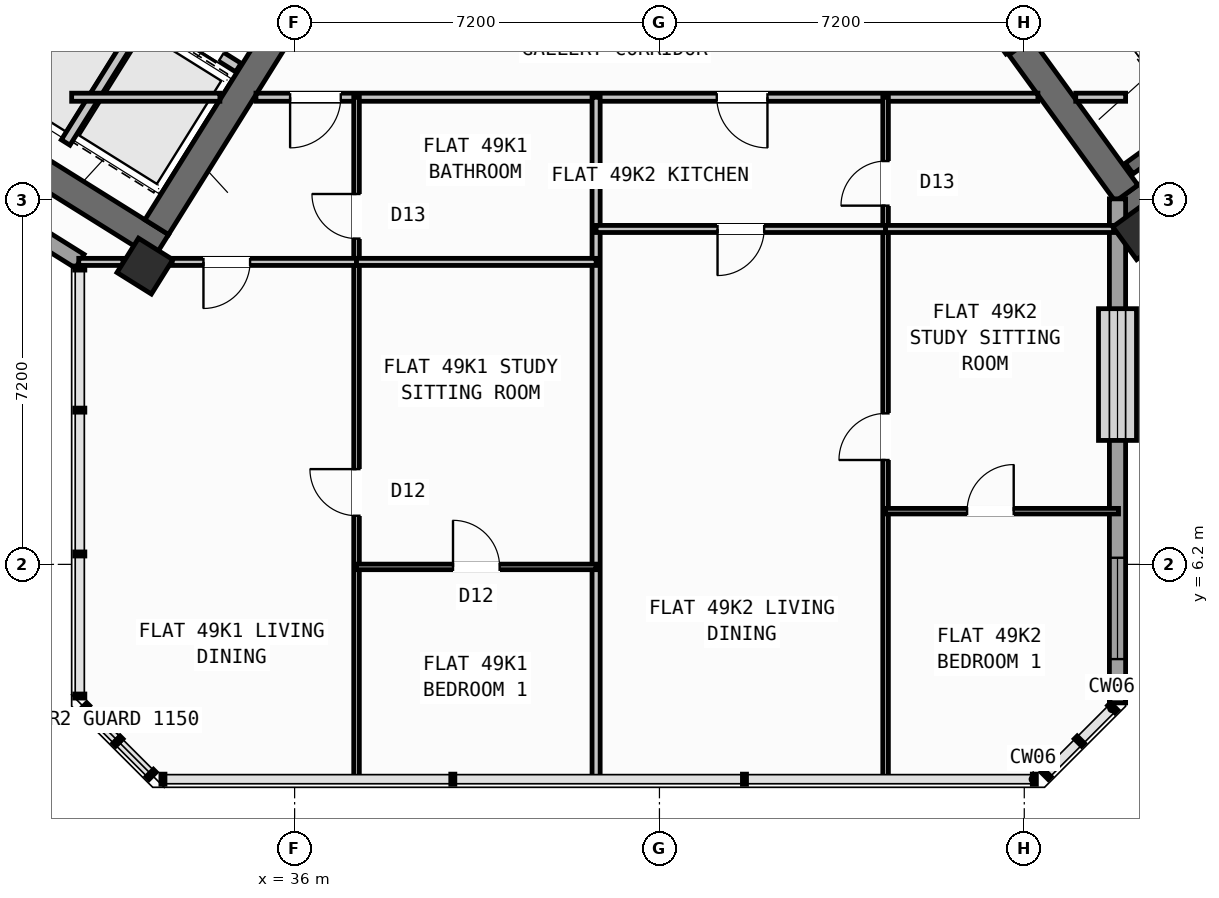
"""IFC4 building model, lengths in metres.
Left out: names, types, materials, properties, quantities, classifications, styles, units other than length and angle.
Written with IfcOpenShell. Run it as: python <this file> out.ifc"""

import sys

from ifc_helpers import new_model, si_unit, direction, frame, frame_2d, origin, origin_2d, place, context, subcontext, project, spatial, rectangle, hollow_rectangle, extrude, source, transform, mapped, element, fill, save


model = new_model("IFC4")
c1 = context("Model", 3, precision=1e-05, world=origin(), true_north=direction((0.0, 1.0)))
c2 = subcontext(c1, "Body", "Model", "MODEL_VIEW")
j1 = project(units=[si_unit("LENGTHUNIT", "METRE"), si_unit("PLANEANGLEUNIT", "RADIAN")], contexts=[c1])
p1 = place(None, origin())
s1 = spatial("IfcSite", under=j1, at=p1, CompositionType="ELEMENT")
p2 = place(p1, origin())
s2 = spatial("IfcBuilding", under=s1, at=p2, CompositionType="ELEMENT")
p3 = place(p2, frame((0.0, 0.0, 195.0)))
s3 = spatial("IfcBuildingStorey", under=s2, at=p3, CompositionType="ELEMENT", Elevation=195.0)
p4 = place(p3, frame((33.366, 12.477, 0.0), z_axis=(0.0, 0.0, 1.0), x_axis=(-0.848047359947, 0.529920442413, 0.0)))
e1 = element("IfcWall", 1, at=p4, inside=s3, PredefinedType="SHEAR", context=c2, shape_type="SweptSolid", body=[
    extrude(rectangle(XDim=13.14, YDim=0.55, at=frame_2d((6.57, 0.0))), origin(), (0.0, 0.0, 1.0), 4.22),
])
p5 = place(p3, frame((36.683, 18.304, 0.0), z_axis=(0.0, 0.0, 1.0), x_axis=(-0.529896466841, -0.848062341122, 0.0)))
e2 = element("IfcWall", 2, at=p5, inside=s3, PredefinedType="SHEAR", context=c2, shape_type="SweptSolid", body=[
    extrude(rectangle(XDim=6.425, YDim=0.55, at=frame_2d((3.212, 0.0))), origin(), (0.0, 0.0, 1.0), 4.22),
])
p6 = place(p3, frame((52.359, 13.14, 0.0), z_axis=(0.0, 0.0, 1.0), x_axis=(0.809014896919, 0.587788139183, 0.0)))
e3 = element("IfcWall", 3, at=p6, inside=s3, PredefinedType="SHEAR", context=c2, shape_type="SweptSolid", body=[
    extrude(rectangle(XDim=12.34, YDim=0.55, at=frame_2d((6.17, 0.0))), origin(), (0.0, 0.0, 1.0), 4.22),
])
p7 = place(p3, frame((52.42, 13.524, 0.0), z_axis=(0.0, 0.0, 1.0), x_axis=(-0.587802113096, 0.809004744015, 0.0)))
e4 = element("IfcWall", 4, at=p7, inside=s3, PredefinedType="SHEAR", context=c2, shape_type="SweptSolid", body=[
    extrude(rectangle(XDim=3.575, YDim=0.55, at=frame_2d((1.788, 0.0))), origin(), (0.0, 0.0, 1.0), 4.22),
])
m1 = source(origin(), c2, "Body", "SweptSolid", [
    extrude(hollow_rectangle(XDim=0.8, YDim=0.8, WallThickness=0.032, at=origin_2d()), origin(), (0.0, 0.0, 1.0), 4.5),
])
for number, where, z_axis, x_axis in (
    (5, (33.046, 12.087, 0.0), (0.0, 0.0, 1.0), (-0.848, 0.53, 0.0)),
    (6, (52.705, 12.773, 0.0), (0.0, 0.0, 1.0), (0.809, 0.588, 0.0)),
):
    element("IfcColumn", number, at=place(p3, frame(where, z_axis=z_axis, x_axis=x_axis)), inside=s3, PredefinedType="COLUMN", context=c2, shape_type="MappedRepresentation", body=[
        mapped(m1, transform((0.0, 0.0, 0.0), scale=1.0)),
    ])
p8 = place(p3, frame((31.76, 12.183, 0.0), z_axis=(0.0, 0.0, 1.0), x_axis=(-0.848047074256, 0.529920899612, 0.0)))
e7 = element("IfcWall", 7, at=p8, inside=s3, PredefinedType="STANDARD", context=c2, shape_type="SweptSolid", body=[
    extrude(rectangle(XDim=30.652, YDim=0.32, at=frame_2d((15.326, 0.0))), origin(), (0.0, 0.0, 1.0), 4.22),
])
p9 = place(p8, frame((15.166, 0.0, 0.0)))
e8 = element("IfcOpeningElement", 8, at=p9, cuts=e7, PredefinedType="OPENING", context=c2, shape_type="SweptSolid", body=[
    extrude(rectangle(XDim=1.2, YDim=2.15, at=frame_2d((0.6, 1.075))), frame((0.0, 0.17, 0.0), z_axis=(0.0, -1.0, 0.0), x_axis=(1.0, 0.0, 0.0)), (0.0, 0.0, 1.0), 0.34),
])
p10 = place(p8, frame((1.765, 0.0, 0.7)))
e9 = element("IfcOpeningElement", 9, at=p10, cuts=e7, PredefinedType="OPENING", context=c2, shape_type="SweptSolid", body=[
    extrude(rectangle(XDim=2.6, YDim=2.0, at=frame_2d((1.3, 1.0))), frame((0.0, 0.17, 0.0), z_axis=(0.0, -1.0, 0.0), x_axis=(1.0, 0.0, 0.0)), (0.0, 0.0, 1.0), 0.34),
])
p11 = place(p8, frame((6.994, 0.0, 0.7)))
e10 = element("IfcOpeningElement", 10, at=p11, cuts=e7, PredefinedType="OPENING", context=c2, shape_type="SweptSolid", body=[
    extrude(rectangle(XDim=2.6, YDim=2.0, at=frame_2d((1.3, 1.0))), frame((0.0, 0.17, 0.0), z_axis=(0.0, -1.0, 0.0), x_axis=(1.0, 0.0, 0.0)), (0.0, 0.0, 1.0), 0.34),
])
p12 = place(p8, frame((19.101, 0.0, 0.85)))
e11 = element("IfcOpeningElement", 11, at=p12, cuts=e7, PredefinedType="OPENING", context=c2, shape_type="SweptSolid", body=[
    extrude(rectangle(XDim=1.6, YDim=1.8, at=frame_2d((0.8, 0.9))), frame((0.0, 0.17, 0.0), z_axis=(0.0, -1.0, 0.0), x_axis=(1.0, 0.0, 0.0)), (0.0, 0.0, 1.0), 0.34),
])
p13 = place(p8, frame((26.358, 0.0, 0.7)))
e12 = element("IfcOpeningElement", 12, at=p13, cuts=e7, PredefinedType="OPENING", context=c2, shape_type="SweptSolid", body=[
    extrude(rectangle(XDim=2.6, YDim=2.0, at=frame_2d((1.3, 1.0))), frame((0.0, 0.17, 0.0), z_axis=(0.0, -1.0, 0.0), x_axis=(1.0, 0.0, 0.0)), (0.0, 0.0, 1.0), 0.34),
])
p14 = place(p3, frame((52.24, 13.414, 0.0), z_axis=(0.0, 0.0, 1.0), x_axis=(0.0, -1.0, 0.0)))
e13 = element("IfcWall", 13, at=p14, inside=s3, PredefinedType="STANDARD", context=c2, shape_type="SweptSolid", body=[
    extrude(rectangle(XDim=9.948, YDim=0.32, at=frame_2d((4.974, 0.0))), origin(), (0.0, 0.0, 1.0), 4.22),
])
p15 = place(p14, frame((2.167, 0.0, 0.7)))
e14 = element("IfcOpeningElement", 14, at=p15, cuts=e13, PredefinedType="OPENING", context=c2, shape_type="SweptSolid", body=[
    extrude(rectangle(XDim=2.6, YDim=2.0, at=frame_2d((1.3, 1.0))), frame((0.0, 0.17, 0.0), z_axis=(0.0, -1.0, 0.0), x_axis=(1.0, 0.0, 0.0)), (0.0, 0.0, 1.0), 0.34),
])
p16 = place(p14, frame((7.083, 0.0, 0.75)))
e15 = element("IfcOpeningElement", 15, at=p16, cuts=e13, PredefinedType="OPENING", context=c2, shape_type="SweptSolid", body=[
    extrude(rectangle(XDim=2.0, YDim=1.95, at=frame_2d((1.0, 0.975))), frame((0.0, 0.17, 0.0), z_axis=(0.0, -1.0, 0.0), x_axis=(1.0, 0.0, 0.0)), (0.0, 0.0, 1.0), 0.34),
])
p17 = place(p3, frame((31.288, 18.256, 0.0), z_axis=(0.0, 0.0, 1.0), x_axis=(-0.529943379326, -0.848033026897, 0.0)))
e16 = element("IfcWall", 16, at=p17, inside=s3, PredefinedType="SHEAR", context=c2, shape_type="SweptSolid", body=[
    extrude(rectangle(XDim=3.16, YDim=0.26, at=frame_2d((1.58, 0.0))), origin(), (0.0, 0.0, 1.0), 4.22),
])
p18 = place(p3, frame((34.891, 16.005, 0.0), z_axis=(0.0, 0.0, 1.0), x_axis=(-0.848062873452, 0.529895614884, 0.0)))
e17 = element("IfcWall", 17, at=p18, inside=s3, PredefinedType="STANDARD", context=c2, shape_type="SweptSolid", body=[
    extrude(rectangle(XDim=4.248, YDim=0.2, at=frame_2d((2.124, 0.0))), origin(), (0.0, 0.0, 1.0), 4.21),
])
p19 = place(p18, frame((0.398, 0.0, 0.0)))
e18 = element("IfcOpeningElement", 18, at=p19, cuts=e17, PredefinedType="OPENING", context=c2, shape_type="SweptSolid", body=[
    extrude(rectangle(XDim=1.3, YDim=2.2, at=frame_2d((0.65, 1.1))), frame((0.0, 0.11, 0.0), z_axis=(0.0, -1.0, 0.0), x_axis=(1.0, 0.0, 0.0)), (0.0, 0.0, 1.0), 0.22),
])
p20 = place(p18, frame((2.473, 0.0, 0.0)))
e19 = element("IfcOpeningElement", 19, at=p20, cuts=e17, PredefinedType="OPENING", context=c2, shape_type="SweptSolid", body=[
    extrude(rectangle(XDim=1.45, YDim=2.25, at=frame_2d((0.725, 1.125))), frame((0.0, 0.11, 0.0), z_axis=(0.0, -1.0, 0.0), x_axis=(1.0, 0.0, 0.0)), (0.0, 0.0, 1.0), 0.22),
])
p21 = place(p3, frame((33.029, 17.003, 0.0), z_axis=(0.0, 0.0, 1.0), x_axis=(-0.529916267533, -0.848049968695, 0.0)))
e20 = element("IfcWall", 20, at=p21, inside=s3, PredefinedType="STANDARD", context=c2, shape_type="SweptSolid", body=[
    extrude(rectangle(XDim=2.92, YDim=0.2, at=frame_2d((1.46, 0.0))), origin(), (0.0, 0.0, 1.0), 4.21),
])
p22 = place(p3, frame((52.472, 14.013, 0.0), z_axis=(0.0, 0.0, 1.0), x_axis=(0.809028366311, 0.587769599847, 0.0)))
e21 = element("IfcWall", 21, at=p22, inside=s3, PredefinedType="SHEAR", context=c2, shape_type="SweptSolid", body=[
    extrude(rectangle(XDim=7.33, YDim=0.26, at=frame_2d((3.665, 0.0))), origin(), (0.0, 0.0, 1.0), 4.22),
])
p23 = place(p3, frame((31.6, 15.42, 0.0), z_axis=(0.0, 0.0, 1.0), x_axis=(1.0, 0.0, 0.0)))
e22 = element("IfcWall", 22, at=p23, inside=s3, PredefinedType="PARTITIONING", context=c2, shape_type="SweptSolid", body=[
    extrude(rectangle(XDim=2.925, YDim=0.16, at=frame_2d((1.462, 0.0))), origin(), (0.0, 0.0, 1.0), 4.21),
])
p24 = place(p3, frame((35.237, 15.42, 0.0), z_axis=(0.0, 0.0, 1.0), x_axis=(1.0, 0.0, 0.0)))
e23 = element("IfcWall", 23, at=p24, inside=s3, PredefinedType="PARTITIONING", context=c2, shape_type="SweptSolid", body=[
    extrude(rectangle(XDim=15.432, YDim=0.16, at=frame_2d((7.716, 0.0))), origin(), (0.0, 0.0, 1.0), 4.21),
])
p25 = place(p24, frame((0.674, 0.0, 0.0)))
e24 = element("IfcOpeningElement", 24, at=p25, cuts=e23, PredefinedType="OPENING", context=c2, shape_type="SweptSolid", body=[
    extrude(rectangle(XDim=1.0, YDim=2.1, at=frame_2d((0.5, 1.05))), frame((0.0, 0.09, 0.0), z_axis=(0.0, -1.0, 0.0), x_axis=(1.0, 0.0, 0.0)), (0.0, 0.0, 1.0), 0.18),
])
p26 = place(p24, frame((9.094, 0.0, 0.0)))
e25 = element("IfcOpeningElement", 25, at=p26, cuts=e23, PredefinedType="OPENING", context=c2, shape_type="SweptSolid", body=[
    extrude(rectangle(XDim=1.0, YDim=2.1, at=frame_2d((0.5, 1.05))), frame((0.0, 0.09, 0.0), z_axis=(0.0, -1.0, 0.0), x_axis=(1.0, 0.0, 0.0)), (0.0, 0.0, 1.0), 0.18),
])
p27 = place(p3, frame((51.416, 15.42, 0.0), z_axis=(0.0, 0.0, 1.0), x_axis=(1.0, 0.0, 0.0)))
e26 = element("IfcWall", 26, at=p27, inside=s3, PredefinedType="PARTITIONING", context=c2, shape_type="SweptSolid", body=[
    extrude(rectangle(XDim=0.984, YDim=0.16, at=frame_2d((0.492, 0.0))), origin(), (0.0, 0.0, 1.0), 4.21),
])
p28 = place(p3, frame((50.119, 16.333, 0.0), z_axis=(0.0, 0.0, 1.0), x_axis=(-0.587749856981, 0.809042709391, 0.0)))
e27 = element("IfcWall", 27, at=p28, inside=s3, PredefinedType="STANDARD", context=c2, shape_type="SweptSolid", body=[
    extrude(rectangle(XDim=2.96, YDim=0.2, at=frame_2d((1.48, 0.0))), origin(), (0.0, 0.0, 1.0), 4.21),
])
p29 = place(p28, frame((0.53, 0.0, 0.0)))
e28 = element("IfcOpeningElement", 28, at=p29, cuts=e27, PredefinedType="OPENING", context=c2, shape_type="SweptSolid", body=[
    extrude(rectangle(XDim=1.5, YDim=2.15, at=frame_2d((0.75, 1.075))), frame((0.0, 0.11, 0.0), z_axis=(0.0, -1.0, 0.0), x_axis=(1.0, 0.0, 0.0)), (0.0, 0.0, 1.0), 0.22),
])
p30 = place(p3, frame((41.95, 1.96, 0.0), z_axis=(0.0, 0.0, 1.0), x_axis=(0.0, 1.0, 0.0)))
e29 = element("IfcWall", 29, at=p30, inside=s3, PredefinedType="PARTITIONING", context=c2, shape_type="SweptSolid", body=[
    extrude(rectangle(XDim=13.46, YDim=0.16, at=frame_2d((6.73, 0.0))), origin(), (0.0, 0.0, 1.0), 4.21),
])
p31 = place(p3, frame((37.222, 1.96, 0.0), z_axis=(0.0, 0.0, 1.0), x_axis=(0.0, 1.0, 0.0)))
e30 = element("IfcWall", 30, at=p31, inside=s3, PredefinedType="PARTITIONING", context=c2, shape_type="SweptSolid", body=[
    extrude(rectangle(XDim=13.46, YDim=0.11, at=frame_2d((6.73, 0.0))), origin(), (0.0, 0.0, 1.0), 4.21),
])
p32 = place(p31, frame((5.2, 0.0, 0.0)))
e31 = element("IfcOpeningElement", 31, at=p32, cuts=e30, PredefinedType="OPENING", context=c2, shape_type="SweptSolid", body=[
    extrude(rectangle(XDim=0.92, YDim=2.08, at=frame_2d((0.46, 1.04))), frame((0.0, 0.065, 0.0), z_axis=(0.0, -1.0, 0.0), x_axis=(1.0, 0.0, 0.0)), (0.0, 0.0, 1.0), 0.13),
])
p33 = place(p31, frame((10.67, 0.0, 0.0)))
e32 = element("IfcOpeningElement", 32, at=p33, cuts=e30, PredefinedType="OPENING", context=c2, shape_type="SweptSolid", body=[
    extrude(rectangle(XDim=0.88, YDim=2.08, at=frame_2d((0.44, 1.04))), frame((0.0, 0.065, 0.0), z_axis=(0.0, -1.0, 0.0), x_axis=(1.0, 0.0, 0.0)), (0.0, 0.0, 1.0), 0.13),
])
p34 = place(p3, frame((31.74, 12.17, 0.0), z_axis=(0.0, 0.0, 1.0), x_axis=(1.0, 0.0, 0.0)))
e33 = element("IfcWall", 33, at=p34, inside=s3, PredefinedType="PLUMBINGWALL", context=c2, shape_type="SweptSolid", body=[
    extrude(rectangle(XDim=0.872, YDim=0.14, at=frame_2d((0.436, 0.0))), origin(), (0.0, 0.0, 1.0), 4.21),
])
p35 = place(p3, frame((33.584, 12.17, 0.0), z_axis=(0.0, 0.0, 1.0), x_axis=(1.0, 0.0, 0.0)))
e34 = element("IfcWall", 34, at=p35, inside=s3, PredefinedType="PLUMBINGWALL", context=c2, shape_type="SweptSolid", body=[
    extrude(rectangle(XDim=3.638, YDim=0.14, at=frame_2d((1.819, 0.0))), origin(), (0.0, 0.0, 1.0), 3.395),
])
p36 = place(p35, frame((0.617, 0.0, 0.0)))
e35 = element("IfcOpeningElement", 35, at=p36, cuts=e34, PredefinedType="OPENING", context=c2, shape_type="SweptSolid", body=[
    extrude(rectangle(XDim=0.92, YDim=2.08, at=frame_2d((0.46, 1.04))), frame((0.0, 0.08, 0.0), z_axis=(0.0, -1.0, 0.0), x_axis=(1.0, 0.0, 0.0)), (0.0, 0.0, 1.0), 0.16),
])
p37 = place(p3, frame((37.222, 12.17, 0.0), z_axis=(0.0, 0.0, 1.0), x_axis=(1.0, 0.0, 0.0)))
e36 = element("IfcWall", 36, at=p37, inside=s3, PredefinedType="PLUMBINGWALL", context=c2, shape_type="SweptSolid", body=[
    extrude(rectangle(XDim=4.728, YDim=0.14, at=frame_2d((2.364, 0.0))), origin(), (0.0, 0.0, 1.0), 3.395),
])
p38 = place(p3, frame((37.222, 6.15, 0.0), z_axis=(0.0, 0.0, 1.0), x_axis=(1.0, 0.0, 0.0)))
e37 = element("IfcWall", 37, at=p38, inside=s3, PredefinedType="PARTITIONING", context=c2, shape_type="SweptSolid", body=[
    extrude(rectangle(XDim=4.728, YDim=0.11, at=frame_2d((2.364, 0.0))), origin(), (0.0, 0.0, 1.0), 4.21),
])
p39 = place(p38, frame((1.904, 0.0, 0.0)))
e38 = element("IfcOpeningElement", 38, at=p39, cuts=e37, PredefinedType="OPENING", context=c2, shape_type="SweptSolid", body=[
    extrude(rectangle(XDim=0.92, YDim=2.08, at=frame_2d((0.46, 1.04))), frame((0.0, 0.065, 0.0), z_axis=(0.0, -1.0, 0.0), x_axis=(1.0, 0.0, 0.0)), (0.0, 0.0, 1.0), 0.13),
])
p40 = place(p3, frame((47.663, 1.96, 0.0), z_axis=(0.0, 0.0, 1.0), x_axis=(0.0, 1.0, 0.0)))
e39 = element("IfcWall", 39, at=p40, inside=s3, PredefinedType="PARTITIONING", context=c2, shape_type="SweptSolid", body=[
    extrude(rectangle(XDim=13.46, YDim=0.11, at=frame_2d((6.73, 0.0))), origin(), (0.0, 0.0, 1.0), 4.21),
])
p41 = place(p40, frame((6.3, 0.0, 0.0)))
e40 = element("IfcOpeningElement", 40, at=p41, cuts=e39, PredefinedType="OPENING", context=c2, shape_type="SweptSolid", body=[
    extrude(rectangle(XDim=0.92, YDim=2.08, at=frame_2d((0.46, 1.04))), frame((0.0, 0.065, 0.0), z_axis=(0.0, -1.0, 0.0), x_axis=(1.0, 0.0, 0.0)), (0.0, 0.0, 1.0), 0.13),
])
p42 = place(p40, frame((11.32, 0.0, 0.0)))
e41 = element("IfcOpeningElement", 41, at=p42, cuts=e39, PredefinedType="OPENING", context=c2, shape_type="SweptSolid", body=[
    extrude(rectangle(XDim=0.88, YDim=2.08, at=frame_2d((0.44, 1.04))), frame((0.0, 0.065, 0.0), z_axis=(0.0, -1.0, 0.0), x_axis=(1.0, 0.0, 0.0)), (0.0, 0.0, 1.0), 0.13),
])
p43 = place(p3, frame((41.95, 12.82, 0.0), z_axis=(0.0, 0.0, 1.0), x_axis=(1.0, 0.0, 0.0)))
e42 = element("IfcWall", 42, at=p43, inside=s3, PredefinedType="PLUMBINGWALL", context=c2, shape_type="SweptSolid", body=[
    extrude(rectangle(XDim=5.713, YDim=0.14, at=frame_2d((2.856, 0.0))), origin(), (0.0, 0.0, 1.0), 3.395),
])
p44 = place(p43, frame((2.396, 0.0, 0.0)))
e43 = element("IfcOpeningElement", 43, at=p44, cuts=e42, PredefinedType="OPENING", context=c2, shape_type="SweptSolid", body=[
    extrude(rectangle(XDim=0.92, YDim=2.08, at=frame_2d((0.46, 1.04))), frame((0.0, 0.08, 0.0), z_axis=(0.0, -1.0, 0.0), x_axis=(1.0, 0.0, 0.0)), (0.0, 0.0, 1.0), 0.16),
])
p45 = place(p3, frame((47.663, 12.82, 0.0), z_axis=(0.0, 0.0, 1.0), x_axis=(1.0, 0.0, 0.0)))
e44 = element("IfcWall", 44, at=p45, inside=s3, PredefinedType="PLUMBINGWALL", context=c2, shape_type="SweptSolid", body=[
    extrude(rectangle(XDim=4.499, YDim=0.14, at=frame_2d((2.25, 0.0))), origin(), (0.0, 0.0, 1.0), 3.395),
])
p46 = place(p3, frame((47.663, 7.25, 0.0), z_axis=(0.0, 0.0, 1.0), x_axis=(1.0, 0.0, 0.0)))
e45 = element("IfcWall", 45, at=p46, inside=s3, PredefinedType="PARTITIONING", context=c2, shape_type="SweptSolid", body=[
    extrude(rectangle(XDim=4.597, YDim=0.11, at=frame_2d((2.298, 0.0))), origin(), (0.0, 0.0, 1.0), 4.21),
])
p47 = place(p46, frame((1.608, 0.0, 0.0)))
e46 = element("IfcOpeningElement", 46, at=p47, cuts=e45, PredefinedType="OPENING", context=c2, shape_type="SweptSolid", body=[
    extrude(rectangle(XDim=0.92, YDim=2.08, at=frame_2d((0.46, 1.04))), frame((0.0, 0.065, 0.0), z_axis=(0.0, -1.0, 0.0), x_axis=(1.0, 0.0, 0.0)), (0.0, 0.0, 1.0), 0.13),
])
m2 = source(origin(), c2, "Body", "SweptSolid", [
    extrude(rectangle(XDim=2.6, YDim=2.0, at=frame_2d((1.3, 1.0))), frame((0.0, 0.03, 0.0), z_axis=(0.0, -1.0, 0.0), x_axis=(1.0, 0.0, 0.0)), (0.0, 0.0, 1.0), 0.06),
])
p48 = place(p15, origin())
e47 = element("IfcWindow", 47, at=p48, inside=s3, PartitioningType="SINGLE_PANEL", PredefinedType="WINDOW", context=c2, shape_type="MappedRepresentation", body=[
    mapped(m2, transform((0.0, 0.0, 0.0), scale=1.0)),
])
fill(e14, e47)
m3 = source(origin(), c2, "Body", "SweptSolid", [
    extrude(rectangle(XDim=2.0, YDim=1.95, at=frame_2d((1.0, 0.975))), frame((0.0, 0.03, 0.0), z_axis=(0.0, -1.0, 0.0), x_axis=(1.0, 0.0, 0.0)), (0.0, 0.0, 1.0), 0.06),
])
p49 = place(p16, origin())
e48 = element("IfcWindow", 48, at=p49, inside=s3, PartitioningType="SINGLE_PANEL", PredefinedType="WINDOW", context=c2, shape_type="MappedRepresentation", body=[
    mapped(m3, transform((0.0, 0.0, 0.0), scale=1.0)),
])
fill(e15, e48)
m4 = source(origin(), c2, "Body", "SweptSolid", [
    extrude(rectangle(XDim=1.3, YDim=2.2, at=frame_2d((0.65, 1.1))), frame((0.0, 0.025, 0.0), z_axis=(0.0, -1.0, 0.0), x_axis=(1.0, 0.0, 0.0)), (0.0, 0.0, 1.0), 0.05),
])
p50 = place(p19, origin())
e49 = element("IfcDoor", 49, at=p50, inside=s3, OperationType="DOUBLE_DOOR_SLIDING", PredefinedType="DOOR", context=c2, shape_type="MappedRepresentation", body=[
    mapped(m4, transform((0.0, 0.0, 0.0), scale=1.0)),
])
fill(e18, e49)
m5 = source(origin(), c2, "Body", "SweptSolid", [
    extrude(rectangle(XDim=0.92, YDim=2.08, at=frame_2d((0.46, 1.04))), frame((0.0, 0.025, 0.0), z_axis=(0.0, -1.0, 0.0), x_axis=(1.0, 0.0, 0.0)), (0.0, 0.0, 1.0), 0.05),
])
p51 = place(p32, origin())
e50 = element("IfcDoor", 50, at=p51, inside=s3, OperationType="SINGLE_SWING_RIGHT", PredefinedType="DOOR", context=c2, shape_type="MappedRepresentation", body=[
    mapped(m5, transform((0.0, 0.0, 0.0), scale=1.0)),
])
fill(e31, e50)
p52 = place(p39, origin())
e51 = element("IfcDoor", 51, at=p52, inside=s3, OperationType="SINGLE_SWING_LEFT", PredefinedType="DOOR", context=c2, shape_type="MappedRepresentation", body=[
    mapped(m5, transform((0.0, 0.0, 0.0), scale=1.0)),
])
fill(e38, e51)
m6 = source(origin(), c2, "Body", "SweptSolid", [
    extrude(rectangle(XDim=1.0, YDim=2.1, at=frame_2d((0.5, 1.05))), frame((0.0, 0.025, 0.0), z_axis=(0.0, -1.0, 0.0), x_axis=(1.0, 0.0, 0.0)), (0.0, 0.0, 1.0), 0.05),
])
p53 = place(p25, frame((1.0, 0.0, 0.0), z_axis=(0.0, 0.0, 1.0), x_axis=(-1.0, 0.0, 0.0)))
e52 = element("IfcDoor", 52, at=p53, inside=s3, OperationType="SINGLE_SWING_RIGHT", PredefinedType="DOOR", context=c2, shape_type="MappedRepresentation", body=[
    mapped(m6, transform((0.0, 0.0, 0.0), scale=1.0)),
])
fill(e24, e52)
p54 = place(p36, frame((0.92, 0.0, 0.0), z_axis=(0.0, 0.0, 1.0), x_axis=(-1.0, 0.0, 0.0)))
e53 = element("IfcDoor", 53, at=p54, inside=s3, OperationType="SINGLE_SWING_RIGHT", PredefinedType="DOOR", context=c2, shape_type="MappedRepresentation", body=[
    mapped(m5, transform((0.0, 0.0, 0.0), scale=1.0)),
])
fill(e35, e53)
m7 = source(origin(), c2, "Body", "SweptSolid", [
    extrude(rectangle(XDim=0.88, YDim=2.08, at=frame_2d((0.44, 1.04))), frame((0.0, 0.025, 0.0), z_axis=(0.0, -1.0, 0.0), x_axis=(1.0, 0.0, 0.0)), (0.0, 0.0, 1.0), 0.05),
])
p55 = place(p33, origin())
e54 = element("IfcDoor", 54, at=p55, inside=s3, OperationType="SINGLE_SWING_RIGHT", PredefinedType="DOOR", context=c2, shape_type="MappedRepresentation", body=[
    mapped(m7, transform((0.0, 0.0, 0.0), scale=1.0)),
])
fill(e32, e54)
p56 = place(p41, origin())
e55 = element("IfcDoor", 55, at=p56, inside=s3, OperationType="SINGLE_SWING_LEFT", PredefinedType="DOOR", context=c2, shape_type="MappedRepresentation", body=[
    mapped(m5, transform((0.0, 0.0, 0.0), scale=1.0)),
])
fill(e40, e55)
p57 = place(p47, origin())
e56 = element("IfcDoor", 56, at=p57, inside=s3, OperationType="SINGLE_SWING_RIGHT", PredefinedType="DOOR", context=c2, shape_type="MappedRepresentation", body=[
    mapped(m5, transform((0.0, 0.0, 0.0), scale=1.0)),
])
fill(e46, e56)
p58 = place(p26, frame((1.0, 0.0, 0.0), z_axis=(0.0, 0.0, 1.0), x_axis=(-1.0, 0.0, 0.0)))
e57 = element("IfcDoor", 57, at=p58, inside=s3, OperationType="SINGLE_SWING_LEFT", PredefinedType="DOOR", context=c2, shape_type="MappedRepresentation", body=[
    mapped(m6, transform((0.0, 0.0, 0.0), scale=1.0)),
])
fill(e25, e57)
p59 = place(p44, frame((0.92, 0.0, 0.0), z_axis=(0.0, 0.0, 1.0), x_axis=(-1.0, 0.0, 0.0)))
e58 = element("IfcDoor", 58, at=p59, inside=s3, OperationType="SINGLE_SWING_RIGHT", PredefinedType="DOOR", context=c2, shape_type="MappedRepresentation", body=[
    mapped(m5, transform((0.0, 0.0, 0.0), scale=1.0)),
])
fill(e43, e58)
p60 = place(p42, origin())
e59 = element("IfcDoor", 59, at=p60, inside=s3, OperationType="SINGLE_SWING_LEFT", PredefinedType="DOOR", context=c2, shape_type="MappedRepresentation", body=[
    mapped(m7, transform((0.0, 0.0, 0.0), scale=1.0)),
])
fill(e41, e59)
save(model, sys.argv[1])
